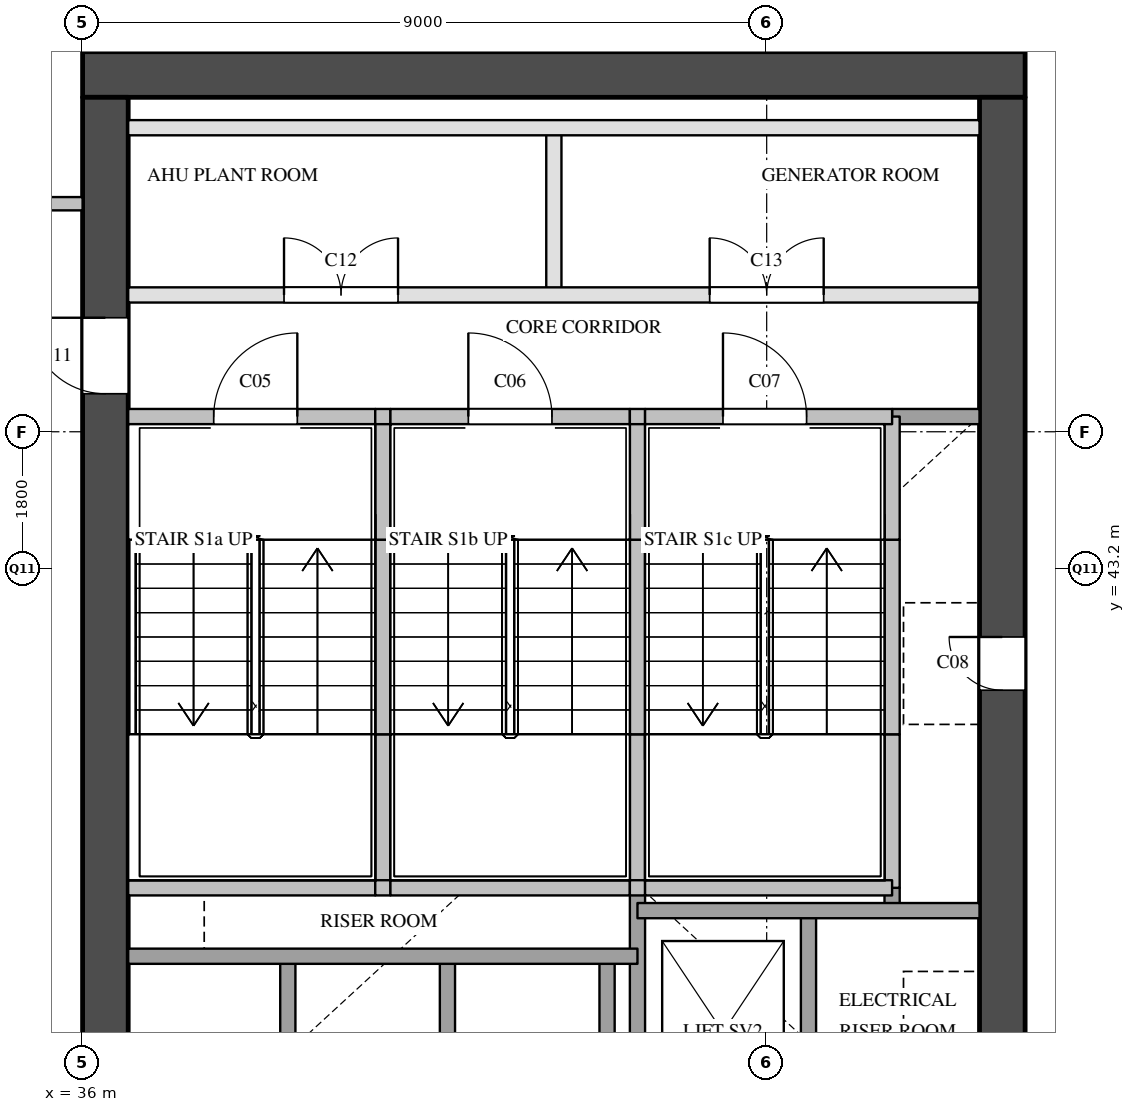
"""IFC4 building model, lengths in metres.
Left out: names, types, materials, properties, quantities, classifications, styles, units other than length and angle.
Written with IfcOpenShell. Run it as: python <this file> out.ifc"""

import sys

from ifc_helpers import new_model, si_unit, direction, frame, frame_2d, origin, place, context, subcontext, project, spatial, rectangle, extrude, element, fill, save


model = new_model("IFC4")
c1 = context("Model", 3, precision=1e-05, world=origin(), true_north=direction((0.0, 1.0)))
c2 = subcontext(c1, "Body", "Model", "MODEL_VIEW")
j1 = project(units=[si_unit("LENGTHUNIT", "METRE"), si_unit("PLANEANGLEUNIT", "RADIAN")], contexts=[c1])
p1 = place(None, origin())
s1 = spatial("IfcSite", under=j1, at=p1, CompositionType="ELEMENT")
p2 = place(p1, origin())
s2 = spatial("IfcBuilding", under=s1, at=p2, CompositionType="ELEMENT")
p3 = place(p2, frame((0.0, 0.0, 123.4)))
s3 = spatial("IfcBuildingStorey", under=s2, at=p3, CompositionType="ELEMENT", Elevation=123.4)
p4 = place(p3, frame((36.0, 49.7, 0.0), z_axis=(0.0, 0.0, 1.0), x_axis=(1.0, 0.0, 0.0)))
e1 = element("IfcWall", 1, at=p4, inside=s3, PredefinedType="SHEAR", context=c2, shape_type="SweptSolid", body=[
    extrude(rectangle(XDim=12.4, YDim=0.6, at=frame_2d((6.2, 0.0))), origin(), (0.0, 0.0, 1.0), 5.7),
])
p5 = place(p3, frame((36.3, 29.1, 0.0), z_axis=(0.0, 0.0, 1.0), x_axis=(0.0, 1.0, 0.0)))
e2 = element("IfcWall", 2, at=p5, inside=s3, PredefinedType="SHEAR", context=c2, shape_type="SweptSolid", body=[
    extrude(rectangle(XDim=20.3, YDim=0.6, at=frame_2d((10.15, 0.0))), origin(), (0.0, 0.0, 1.0), 5.7),
])
p6 = place(p5, frame((3.6, 0.0, 0.0)))
e3 = element("IfcOpeningElement", 3, at=p6, cuts=e2, PredefinedType="OPENING", context=c2, shape_type="SweptSolid", body=[
    extrude(rectangle(XDim=1.8, YDim=2.1, at=frame_2d((0.9, 1.05))), frame((0.0, 0.31, 0.0), z_axis=(0.0, -1.0, 0.0), x_axis=(1.0, 0.0, 0.0)), (0.0, 0.0, 1.0), 0.62),
])
p7 = place(p5, frame((16.4, 0.0, 0.0)))
e4 = element("IfcOpeningElement", 4, at=p7, cuts=e2, PredefinedType="OPENING", context=c2, shape_type="SweptSolid", body=[
    extrude(rectangle(XDim=1.0, YDim=2.1, at=frame_2d((0.5, 1.05))), frame((0.0, 0.31, 0.0), z_axis=(0.0, -1.0, 0.0), x_axis=(1.0, 0.0, 0.0)), (0.0, 0.0, 1.0), 0.62),
])
p8 = place(p3, frame((48.1, 29.1, 0.0), z_axis=(0.0, 0.0, 1.0), x_axis=(0.0, 1.0, 0.0)))
e5 = element("IfcWall", 5, at=p8, inside=s3, PredefinedType="SHEAR", context=c2, shape_type="SweptSolid", body=[
    extrude(rectangle(XDim=20.3, YDim=0.6, at=frame_2d((10.15, 0.0))), origin(), (0.0, 0.0, 1.0), 5.7),
])
p9 = place(p8, frame((12.5, 0.0, 0.0)))
e6 = element("IfcOpeningElement", 6, at=p9, cuts=e5, PredefinedType="OPENING", context=c2, shape_type="SweptSolid", body=[
    extrude(rectangle(XDim=0.7, YDim=2.1, at=frame_2d((0.35, 1.05))), frame((0.0, 0.31, 0.0), z_axis=(0.0, -1.0, 0.0), x_axis=(1.0, 0.0, 0.0)), (0.0, 0.0, 1.0), 0.62),
])
p10 = place(p3, frame((38.7, 34.9, 0.0), z_axis=(0.0, 0.0, 1.0), x_axis=(0.0, 1.0, 0.0)))
e7 = element("IfcWall", 7, at=p10, inside=s3, PredefinedType="SOLIDWALL", context=c2, shape_type="SweptSolid", body=[
    extrude(rectangle(XDim=3.2, YDim=0.2, at=frame_2d((1.6, 0.0))), origin(), (0.0, 0.0, 1.0), 5.7),
])
p11 = place(p3, frame((39.95, 39.0, 0.0), z_axis=(0.0, 0.0, 1.0), x_axis=(0.0, 1.0, 0.0)))
e8 = element("IfcWall", 8, at=p11, inside=s3, PredefinedType="SOLIDWALL", context=c2, shape_type="SweptSolid", body=[
    extrude(rectangle(XDim=2.02, YDim=0.2, at=frame_2d((1.01, 0.0))), origin(), (0.0, 0.0, 1.0), 5.7),
])
p12 = place(p3, frame((39.95, 41.02, 0.0), z_axis=(0.0, 0.0, 1.0), x_axis=(0.0, 1.0, 0.0)))
e9 = element("IfcWall", 9, at=p12, inside=s3, PredefinedType="SOLIDWALL", context=c2, shape_type="SweptSolid", body=[
    extrude(rectangle(XDim=2.56, YDim=0.2, at=frame_2d((1.28, 0.0))), origin(), (0.0, 0.0, 1.0), 5.7),
])
p13 = place(p3, frame((39.95, 43.58, 0.0), z_axis=(0.0, 0.0, 1.0), x_axis=(0.0, 1.0, 0.0)))
e10 = element("IfcWall", 10, at=p13, inside=s3, PredefinedType="SOLIDWALL", context=c2, shape_type="SweptSolid", body=[
    extrude(rectangle(XDim=1.62, YDim=0.2, at=frame_2d((0.81, 0.0))), origin(), (0.0, 0.0, 1.0), 5.7),
])
p14 = place(p3, frame((40.8, 34.9, 0.0), z_axis=(0.0, 0.0, 1.0), x_axis=(0.0, 1.0, 0.0)))
e11 = element("IfcWall", 11, at=p14, inside=s3, PredefinedType="SOLIDWALL", context=c2, shape_type="SweptSolid", body=[
    extrude(rectangle(XDim=3.2, YDim=0.2, at=frame_2d((1.6, 0.0))), origin(), (0.0, 0.0, 1.0), 5.7),
])
p15 = place(p3, frame((42.2, 46.8, 0.0), z_axis=(0.0, 0.0, 1.0), x_axis=(0.0, 1.0, 0.0)))
e12 = element("IfcWall", 12, at=p15, inside=s3, PredefinedType="PARTITIONING", context=c2, shape_type="SweptSolid", body=[
    extrude(rectangle(XDim=2.2, YDim=0.2, at=frame_2d((1.1, 0.0))), origin(), (0.0, 0.0, 1.0), 5.7),
])
p16 = place(p3, frame((42.9, 34.9, 0.0), z_axis=(0.0, 0.0, 1.0), x_axis=(0.0, 1.0, 0.0)))
e13 = element("IfcWall", 13, at=p16, inside=s3, PredefinedType="SOLIDWALL", context=c2, shape_type="SweptSolid", body=[
    extrude(rectangle(XDim=3.2, YDim=0.2, at=frame_2d((1.6, 0.0))), origin(), (0.0, 0.0, 1.0), 5.7),
])
p17 = place(p3, frame((43.3, 29.1, 0.0), z_axis=(0.0, 0.0, 1.0), x_axis=(0.0, 1.0, 0.0)))
e14 = element("IfcWall", 14, at=p17, inside=s3, PredefinedType="SOLIDWALL", context=c2, shape_type="SweptSolid", body=[
    extrude(rectangle(XDim=9.9, YDim=0.2, at=frame_2d((4.95, 0.0))), origin(), (0.0, 0.0, 1.0), 5.7),
])
p18 = place(p17, frame((3.6, 0.0, 0.0)))
e15 = element("IfcOpeningElement", 15, at=p18, cuts=e14, PredefinedType="OPENING", context=c2, shape_type="SweptSolid", body=[
    extrude(rectangle(XDim=1.8, YDim=2.1, at=frame_2d((0.9, 1.05))), frame((0.0, 0.11, 0.0), z_axis=(0.0, -1.0, 0.0), x_axis=(1.0, 0.0, 0.0)), (0.0, 0.0, 1.0), 0.22),
])
p19 = place(p3, frame((43.3, 39.0, 0.0), z_axis=(0.0, 0.0, 1.0), x_axis=(0.0, 1.0, 0.0)))
e16 = element("IfcWall", 16, at=p19, inside=s3, PredefinedType="SOLIDWALL", context=c2, shape_type="SweptSolid", body=[
    extrude(rectangle(XDim=2.02, YDim=0.2, at=frame_2d((1.01, 0.0))), origin(), (0.0, 0.0, 1.0), 5.7),
])
p20 = place(p3, frame((43.3, 41.02, 0.0), z_axis=(0.0, 0.0, 1.0), x_axis=(0.0, 1.0, 0.0)))
e17 = element("IfcWall", 17, at=p20, inside=s3, PredefinedType="SOLIDWALL", context=c2, shape_type="SweptSolid", body=[
    extrude(rectangle(XDim=2.56, YDim=0.2, at=frame_2d((1.28, 0.0))), origin(), (0.0, 0.0, 1.0), 5.7),
])
p21 = place(p3, frame((43.3, 43.58, 0.0), z_axis=(0.0, 0.0, 1.0), x_axis=(0.0, 1.0, 0.0)))
e18 = element("IfcWall", 18, at=p21, inside=s3, PredefinedType="SOLIDWALL", context=c2, shape_type="SweptSolid", body=[
    extrude(rectangle(XDim=1.62, YDim=0.2, at=frame_2d((0.81, 0.0))), origin(), (0.0, 0.0, 1.0), 5.7),
])
p22 = place(p3, frame((45.55, 35.5, 0.0), z_axis=(0.0, 0.0, 1.0), x_axis=(0.0, 1.0, 0.0)))
e19 = element("IfcWall", 19, at=p22, inside=s3, PredefinedType="SOLIDWALL", context=c2, shape_type="SweptSolid", body=[
    extrude(rectangle(XDim=3.2, YDim=0.2, at=frame_2d((1.6, 0.0))), origin(), (0.0, 0.0, 1.0), 5.7),
])
p23 = place(p3, frame((46.65, 38.7, 0.0), z_axis=(0.0, 0.0, 1.0), x_axis=(0.0, 1.0, 0.0)))
e20 = element("IfcWall", 20, at=p23, inside=s3, PredefinedType="SOLIDWALL", context=c2, shape_type="SweptSolid", body=[
    extrude(rectangle(XDim=0.3, YDim=0.2, at=frame_2d((0.15, 0.0))), origin(), (0.0, 0.0, 1.0), 5.7),
])
p24 = place(p3, frame((46.65, 39.0, 0.0), z_axis=(0.0, 0.0, 1.0), x_axis=(0.0, 1.0, 0.0)))
e21 = element("IfcWall", 21, at=p24, inside=s3, PredefinedType="SOLIDWALL", context=c2, shape_type="SweptSolid", body=[
    extrude(rectangle(XDim=2.02, YDim=0.2, at=frame_2d((1.01, 0.0))), origin(), (0.0, 0.0, 1.0), 5.7),
])
p25 = place(p3, frame((46.65, 41.02, 0.0), z_axis=(0.0, 0.0, 1.0), x_axis=(0.0, 1.0, 0.0)))
e22 = element("IfcWall", 22, at=p25, inside=s3, PredefinedType="SOLIDWALL", context=c2, shape_type="SweptSolid", body=[
    extrude(rectangle(XDim=2.56, YDim=0.2, at=frame_2d((1.28, 0.0))), origin(), (0.0, 0.0, 1.0), 5.7),
])
p26 = place(p3, frame((46.65, 43.58, 0.0), z_axis=(0.0, 0.0, 1.0), x_axis=(0.0, 1.0, 0.0)))
e23 = element("IfcWall", 23, at=p26, inside=s3, PredefinedType="SOLIDWALL", context=c2, shape_type="SweptSolid", body=[
    extrude(rectangle(XDim=1.62, YDim=0.2, at=frame_2d((0.81, 0.0))), origin(), (0.0, 0.0, 1.0), 5.7),
])
p27 = place(p3, frame((36.6, 38.1, 0.0), z_axis=(0.0, 0.0, 1.0), x_axis=(1.0, 0.0, 0.0)))
e24 = element("IfcWall", 24, at=p27, inside=s3, PredefinedType="SOLIDWALL", context=c2, shape_type="SweptSolid", body=[
    extrude(rectangle(XDim=6.7, YDim=0.2, at=frame_2d((3.35, 0.0))), origin(), (0.0, 0.0, 1.0), 5.7),
])
p28 = place(p3, frame((43.3, 38.7, 0.0), z_axis=(0.0, 0.0, 1.0), x_axis=(1.0, 0.0, 0.0)))
e25 = element("IfcWall", 25, at=p28, inside=s3, PredefinedType="SOLIDWALL", context=c2, shape_type="SweptSolid", body=[
    extrude(rectangle(XDim=4.5, YDim=0.2, at=frame_2d((2.25, 0.0))), origin(), (0.0, 0.0, 1.0), 5.7),
])
p29 = place(p3, frame((36.6, 39.0, 0.0), z_axis=(0.0, 0.0, 1.0), x_axis=(1.0, 0.0, 0.0)))
e26 = element("IfcWall", 26, at=p29, inside=s3, PredefinedType="SOLIDWALL", context=c2, shape_type="SweptSolid", body=[
    extrude(rectangle(XDim=3.25, YDim=0.2, at=frame_2d((1.625, 0.0))), origin(), (0.0, 0.0, 1.0), 5.7),
])
p30 = place(p3, frame((39.85, 39.0, 0.0), z_axis=(0.0, 0.0, 1.0), x_axis=(1.0, 0.0, 0.0)))
e27 = element("IfcWall", 27, at=p30, inside=s3, PredefinedType="SOLIDWALL", context=c2, shape_type="SweptSolid", body=[
    extrude(rectangle(XDim=0.2, YDim=0.2, at=frame_2d((0.1, 0.0))), origin(), (0.0, 0.0, 1.0), 5.7),
])
p31 = place(p3, frame((40.05, 39.0, 0.0), z_axis=(0.0, 0.0, 1.0), x_axis=(1.0, 0.0, 0.0)))
e28 = element("IfcWall", 28, at=p31, inside=s3, PredefinedType="SOLIDWALL", context=c2, shape_type="SweptSolid", body=[
    extrude(rectangle(XDim=3.15, YDim=0.2, at=frame_2d((1.575, 0.0))), origin(), (0.0, 0.0, 1.0), 5.7),
])
p32 = place(p3, frame((43.2, 39.0, 0.0), z_axis=(0.0, 0.0, 1.0), x_axis=(1.0, 0.0, 0.0)))
e29 = element("IfcWall", 29, at=p32, inside=s3, PredefinedType="SOLIDWALL", context=c2, shape_type="SweptSolid", body=[
    extrude(rectangle(XDim=0.2, YDim=0.2, at=frame_2d((0.1, 0.0))), origin(), (0.0, 0.0, 1.0), 5.7),
])
p33 = place(p3, frame((43.4, 39.0, 0.0), z_axis=(0.0, 0.0, 1.0), x_axis=(1.0, 0.0, 0.0)))
e30 = element("IfcWall", 30, at=p33, inside=s3, PredefinedType="SOLIDWALL", context=c2, shape_type="SweptSolid", body=[
    extrude(rectangle(XDim=3.25, YDim=0.2, at=frame_2d((1.625, 0.0))), origin(), (0.0, 0.0, 1.0), 5.7),
])
p34 = place(p3, frame((46.65, 45.2, 0.0), z_axis=(0.0, 0.0, 1.0), x_axis=(1.0, 0.0, 0.0)))
e31 = element("IfcWall", 31, at=p34, inside=s3, PredefinedType="SOLIDWALL", context=c2, shape_type="SweptSolid", body=[
    extrude(rectangle(XDim=1.15, YDim=0.2, at=frame_2d((0.575, 0.0))), origin(), (0.0, 0.0, 1.0), 5.7),
])
p35 = place(p3, frame((36.6, 45.2, 0.0), z_axis=(0.0, 0.0, 1.0), x_axis=(1.0, 0.0, 0.0)))
e32 = element("IfcWall", 32, at=p35, inside=s3, PredefinedType="SOLIDWALL", context=c2, shape_type="SweptSolid", body=[
    extrude(rectangle(XDim=3.25, YDim=0.2, at=frame_2d((1.625, 0.0))), origin(), (0.0, 0.0, 1.0), 5.7),
])
p36 = place(p35, frame((1.125, 0.0, 0.0)))
e33 = element("IfcOpeningElement", 33, at=p36, cuts=e32, PredefinedType="OPENING", context=c2, shape_type="SweptSolid", body=[
    extrude(rectangle(XDim=1.1, YDim=2.1, at=frame_2d((0.55, 1.05))), frame((0.0, 0.11, 0.0), z_axis=(0.0, -1.0, 0.0), x_axis=(1.0, 0.0, 0.0)), (0.0, 0.0, 1.0), 0.22),
])
p37 = place(p3, frame((39.85, 45.2, 0.0), z_axis=(0.0, 0.0, 1.0), x_axis=(1.0, 0.0, 0.0)))
e34 = element("IfcWall", 34, at=p37, inside=s3, PredefinedType="SOLIDWALL", context=c2, shape_type="SweptSolid", body=[
    extrude(rectangle(XDim=0.2, YDim=0.2, at=frame_2d((0.1, 0.0))), origin(), (0.0, 0.0, 1.0), 5.7),
])
p38 = place(p3, frame((40.05, 45.2, 0.0), z_axis=(0.0, 0.0, 1.0), x_axis=(1.0, 0.0, 0.0)))
e35 = element("IfcWall", 35, at=p38, inside=s3, PredefinedType="SOLIDWALL", context=c2, shape_type="SweptSolid", body=[
    extrude(rectangle(XDim=3.15, YDim=0.2, at=frame_2d((1.575, 0.0))), origin(), (0.0, 0.0, 1.0), 5.7),
])
p39 = place(p38, frame((1.025, 0.0, 0.0)))
e36 = element("IfcOpeningElement", 36, at=p39, cuts=e35, PredefinedType="OPENING", context=c2, shape_type="SweptSolid", body=[
    extrude(rectangle(XDim=1.1, YDim=2.1, at=frame_2d((0.55, 1.05))), frame((0.0, 0.11, 0.0), z_axis=(0.0, -1.0, 0.0), x_axis=(1.0, 0.0, 0.0)), (0.0, 0.0, 1.0), 0.22),
])
p40 = place(p3, frame((43.2, 45.2, 0.0), z_axis=(0.0, 0.0, 1.0), x_axis=(1.0, 0.0, 0.0)))
e37 = element("IfcWall", 37, at=p40, inside=s3, PredefinedType="SOLIDWALL", context=c2, shape_type="SweptSolid", body=[
    extrude(rectangle(XDim=0.2, YDim=0.2, at=frame_2d((0.1, 0.0))), origin(), (0.0, 0.0, 1.0), 5.7),
])
p41 = place(p3, frame((43.4, 45.2, 0.0), z_axis=(0.0, 0.0, 1.0), x_axis=(1.0, 0.0, 0.0)))
e38 = element("IfcWall", 38, at=p41, inside=s3, PredefinedType="SOLIDWALL", context=c2, shape_type="SweptSolid", body=[
    extrude(rectangle(XDim=3.25, YDim=0.2, at=frame_2d((1.625, 0.0))), origin(), (0.0, 0.0, 1.0), 5.7),
])
p42 = place(p41, frame((1.025, 0.0, 0.0)))
e39 = element("IfcOpeningElement", 39, at=p42, cuts=e38, PredefinedType="OPENING", context=c2, shape_type="SweptSolid", body=[
    extrude(rectangle(XDim=1.1, YDim=2.1, at=frame_2d((0.55, 1.05))), frame((0.0, 0.11, 0.0), z_axis=(0.0, -1.0, 0.0), x_axis=(1.0, 0.0, 0.0)), (0.0, 0.0, 1.0), 0.22),
])
p43 = place(p3, frame((36.6, 46.8, 0.0), z_axis=(0.0, 0.0, 1.0), x_axis=(1.0, 0.0, 0.0)))
e40 = element("IfcWall", 40, at=p43, inside=s3, PredefinedType="PARTITIONING", context=c2, shape_type="SweptSolid", body=[
    extrude(rectangle(XDim=11.2, YDim=0.2, at=frame_2d((5.6, 0.0))), origin(), (0.0, 0.0, 1.0), 5.7),
])
p44 = place(p43, frame((2.05, 0.0, 0.0)))
e41 = element("IfcOpeningElement", 41, at=p44, cuts=e40, PredefinedType="OPENING", context=c2, shape_type="SweptSolid", body=[
    extrude(rectangle(XDim=1.5, YDim=2.1, at=frame_2d((0.75, 1.05))), frame((0.0, 0.11, 0.0), z_axis=(0.0, -1.0, 0.0), x_axis=(1.0, 0.0, 0.0)), (0.0, 0.0, 1.0), 0.22),
])
p45 = place(p43, frame((7.65, 0.0, 0.0)))
e42 = element("IfcOpeningElement", 42, at=p45, cuts=e40, PredefinedType="OPENING", context=c2, shape_type="SweptSolid", body=[
    extrude(rectangle(XDim=1.5, YDim=2.1, at=frame_2d((0.75, 1.05))), frame((0.0, 0.11, 0.0), z_axis=(0.0, -1.0, 0.0), x_axis=(1.0, 0.0, 0.0)), (0.0, 0.0, 1.0), 0.22),
])
p46 = place(p3, frame((36.6, 49.0, 0.0), z_axis=(0.0, 0.0, 1.0), x_axis=(1.0, 0.0, 0.0)))
e43 = element("IfcWall", 43, at=p46, inside=s3, PredefinedType="PARTITIONING", context=c2, shape_type="SweptSolid", body=[
    extrude(rectangle(XDim=11.2, YDim=0.2, at=frame_2d((5.6, 0.0))), origin(), (0.0, 0.0, 1.0), 5.7),
])
p47 = place(p3, frame((18.0, 48.0, 0.0), z_axis=(0.0, 0.0, 1.0), x_axis=(1.0, 0.0, 0.0)))
e44 = element("IfcWall", 44, at=p47, inside=s3, PredefinedType="PARTITIONING", context=c2, shape_type="SweptSolid", body=[
    extrude(rectangle(XDim=18.0, YDim=0.175, at=frame_2d((9.0, 0.0))), origin(), (0.0, 0.0, 1.0), 5.7),
])
p48 = place(p47, frame((4.0, 0.0, 0.0)))
e45 = element("IfcOpeningElement", 45, at=p48, cuts=e44, PredefinedType="OPENING", context=c2, shape_type="SweptSolid", body=[
    extrude(rectangle(XDim=1.0, YDim=2.1, at=frame_2d((0.5, 1.05))), frame((0.0, 0.097, 0.0), z_axis=(0.0, -1.0, 0.0), x_axis=(1.0, 0.0, 0.0)), (0.0, 0.0, 1.0), 0.195),
])
p49 = place(p47, frame((13.0, 0.0, 0.0)))
e46 = element("IfcOpeningElement", 46, at=p49, cuts=e44, PredefinedType="OPENING", context=c2, shape_type="SweptSolid", body=[
    extrude(rectangle(XDim=1.0, YDim=2.1, at=frame_2d((0.5, 1.05))), frame((0.0, 0.097, 0.0), z_axis=(0.0, -1.0, 0.0), x_axis=(1.0, 0.0, 0.0)), (0.0, 0.0, 1.0), 0.195),
])
p50 = place(p36, origin())
e47 = element("IfcDoor", 47, at=p50, inside=s3, OperationType="SINGLE_SWING_RIGHT", PredefinedType="DOOR", context=c2, shape_type="SweptSolid", body=[
    extrude(rectangle(XDim=1.1, YDim=2.1, at=frame_2d((0.55, 1.05))), frame((0.0, 0.025, 0.0), z_axis=(0.0, -1.0, 0.0), x_axis=(1.0, 0.0, 0.0)), (0.0, 0.0, 1.0), 0.05),
])
fill(e33, e47)
p51 = place(p39, origin())
e48 = element("IfcDoor", 48, at=p51, inside=s3, OperationType="SINGLE_SWING_LEFT", PredefinedType="DOOR", context=c2, shape_type="SweptSolid", body=[
    extrude(rectangle(XDim=1.1, YDim=2.1, at=frame_2d((0.55, 1.05))), frame((0.0, 0.025, 0.0), z_axis=(0.0, -1.0, 0.0), x_axis=(1.0, 0.0, 0.0)), (0.0, 0.0, 1.0), 0.05),
])
fill(e36, e48)
p52 = place(p42, origin())
e49 = element("IfcDoor", 49, at=p52, inside=s3, OperationType="SINGLE_SWING_LEFT", PredefinedType="DOOR", context=c2, shape_type="SweptSolid", body=[
    extrude(rectangle(XDim=1.1, YDim=2.1, at=frame_2d((0.55, 1.05))), frame((0.0, 0.025, 0.0), z_axis=(0.0, -1.0, 0.0), x_axis=(1.0, 0.0, 0.0)), (0.0, 0.0, 1.0), 0.05),
])
fill(e39, e49)
p53 = place(p9, origin())
e50 = element("IfcDoor", 50, at=p53, inside=s3, OperationType="SINGLE_SWING_RIGHT", PredefinedType="DOOR", context=c2, shape_type="SweptSolid", body=[
    extrude(rectangle(XDim=0.7, YDim=2.1, at=frame_2d((0.35, 1.05))), frame((0.0, 0.025, 0.0), z_axis=(0.0, -1.0, 0.0), x_axis=(1.0, 0.0, 0.0)), (0.0, 0.0, 1.0), 0.05),
])
fill(e6, e50)
p54 = place(p7, origin())
e51 = element("IfcDoor", 51, at=p54, inside=s3, OperationType="SINGLE_SWING_RIGHT", PredefinedType="DOOR", context=c2, shape_type="SweptSolid", body=[
    extrude(rectangle(XDim=1.0, YDim=2.1, at=frame_2d((0.5, 1.05))), frame((0.0, 0.025, 0.0), z_axis=(0.0, -1.0, 0.0), x_axis=(1.0, 0.0, 0.0)), (0.0, 0.0, 1.0), 0.05),
])
fill(e4, e51)
p55 = place(p44, origin())
e52 = element("IfcDoor", 52, at=p55, inside=s3, OperationType="DOUBLE_DOOR_SINGLE_SWING", PredefinedType="DOOR", context=c2, shape_type="SweptSolid", body=[
    extrude(rectangle(XDim=1.5, YDim=2.1, at=frame_2d((0.75, 1.05))), frame((0.0, 0.025, 0.0), z_axis=(0.0, -1.0, 0.0), x_axis=(1.0, 0.0, 0.0)), (0.0, 0.0, 1.0), 0.05),
])
fill(e41, e52)
p56 = place(p45, origin())
e53 = element("IfcDoor", 53, at=p56, inside=s3, OperationType="DOUBLE_DOOR_SINGLE_SWING", PredefinedType="DOOR", context=c2, shape_type="SweptSolid", body=[
    extrude(rectangle(XDim=1.5, YDim=2.1, at=frame_2d((0.75, 1.05))), frame((0.0, 0.025, 0.0), z_axis=(0.0, -1.0, 0.0), x_axis=(1.0, 0.0, 0.0)), (0.0, 0.0, 1.0), 0.05),
])
fill(e42, e53)
save(model, sys.argv[1])
